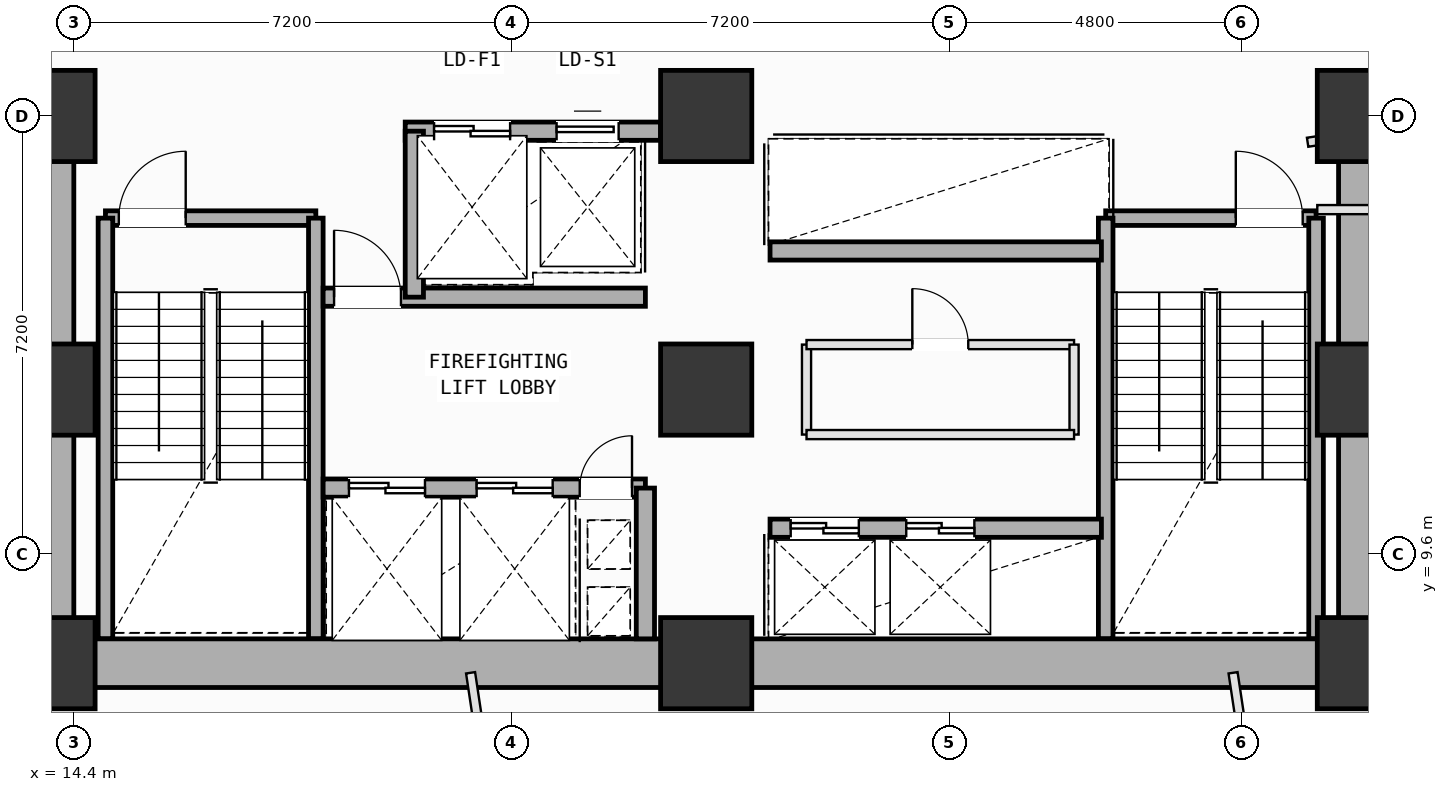
"""IFC4 building model, lengths in metres.
Left out: names, types, materials, properties, quantities, classifications, styles, units other than length and angle.
Written with IfcOpenShell. Run it as: python <this file> out.ifc"""

import sys

from ifc_helpers import new_model, si_unit, direction, frame, frame_2d, origin, origin_2d, place, context, subcontext, project, spatial, rectangle, extrude, element, fill, save


model = new_model("IFC4")
c1 = context("Model", 3, precision=1e-05, world=origin(), true_north=direction((0.0, 1.0)))
c2 = subcontext(c1, "Body", "Model", "MODEL_VIEW")
j1 = project(units=[si_unit("LENGTHUNIT", "METRE"), si_unit("PLANEANGLEUNIT", "RADIAN")], contexts=[c1])
p1 = place(None, origin())
s1 = spatial("IfcSite", under=j1, at=p1, CompositionType="ELEMENT")
p2 = place(p1, origin())
s2 = spatial("IfcBuilding", under=s1, at=p2, CompositionType="ELEMENT")
p3 = place(p2, frame((0.0, 0.0, 59.0)))
s3 = spatial("IfcBuildingStorey", under=s2, at=p3, CompositionType="ELEMENT", Elevation=59.0)
for number, where, z_axis, x_axis in (
    (1, (14.0, 7.8, 0.0), (0.0, 0.0, 1.0), (1.0, 0.0, 0.0)),
    (2, (14.0, 12.3, 0.0), (0.0, 0.0, 1.0), (1.0, 0.0, 0.0)),
    (3, (14.0, 16.8, 0.0), (0.0, 0.0, 1.0), (1.0, 0.0, 0.0)),
    (4, (24.8, 7.8, 0.0), (0.0, 0.0, 1.0), (1.0, 0.0, 0.0)),
    (5, (24.8, 12.3, 0.0), (0.0, 0.0, 1.0), (1.0, 0.0, 0.0)),
    (6, (24.8, 16.8, 0.0), (0.0, 0.0, 1.0), (1.0, 0.0, 0.0)),
    (7, (35.6, 7.8, 0.0), (0.0, 0.0, 1.0), (1.0, 0.0, 0.0)),
    (8, (35.6, 12.3, 0.0), (0.0, 0.0, 1.0), (1.0, 0.0, 0.0)),
    (9, (35.6, 16.8, 0.0), (0.0, 0.0, 1.0), (1.0, 0.0, 0.0)),
):
    element("IfcColumn", number, at=place(p3, frame(where, z_axis=z_axis, x_axis=x_axis)), inside=s3, PredefinedType="COLUMN", context=c2, shape_type="SweptSolid", body=[
        extrude(rectangle(XDim=1.5, YDim=1.5, at=origin_2d()), origin(), (0.0, 0.0, 1.0), 4.0),
    ])
p4 = place(p3, frame((14.92, 15.12, 0.0), z_axis=(0.0, 0.0, 1.0), x_axis=(1.0, 0.0, 0.0)))
e10 = element("IfcWall", 10, at=p4, inside=s3, PredefinedType="SOLIDWALL", context=c2, shape_type="SweptSolid", body=[
    extrude(rectangle(XDim=3.46, YDim=0.24, at=frame_2d((1.73, 0.0))), origin(), (0.0, 0.0, 1.0), 3.78),
])
p5 = place(p4, frame((0.22, 0.0, 0.0)))
e11 = element("IfcOpeningElement", 11, at=p5, cuts=e10, PredefinedType="OPENING", context=c2, shape_type="SweptSolid", body=[
    extrude(rectangle(XDim=1.1, YDim=2.15, at=frame_2d((0.55, 1.075))), frame((0.0, 0.13, 0.0), z_axis=(0.0, -1.0, 0.0), x_axis=(1.0, 0.0, 0.0)), (0.0, 0.0, 1.0), 0.26),
])
for number, where, z_axis, x_axis in (
    (12, (18.38, 15.12, 0.0), (0.0, 0.0, 1.0), (0.0, -1.0, 0.0)),
    (13, (14.92, 8.2, 0.0), (0.0, 0.0, 1.0), (0.0, 1.0, 0.0)),
):
    element("IfcWall", number, at=place(p3, frame(where, z_axis=z_axis, x_axis=x_axis)), inside=s3, PredefinedType="SOLIDWALL", context=c2, shape_type="SweptSolid", body=[
        extrude(rectangle(XDim=6.92, YDim=0.24, at=frame_2d((3.46, 0.0))), origin(), (0.0, 0.0, 1.0), 3.78),
    ])
p6 = place(p3, frame((31.37, 15.12, 0.0), z_axis=(0.0, 0.0, 1.0), x_axis=(1.0, 0.0, 0.0)))
e14 = element("IfcWall", 14, at=p6, inside=s3, PredefinedType="SOLIDWALL", context=c2, shape_type="SweptSolid", body=[
    extrude(rectangle(XDim=3.46, YDim=0.24, at=frame_2d((1.73, 0.0))), origin(), (0.0, 0.0, 1.0), 3.78),
])
p7 = place(p6, frame((2.14, 0.0, 0.0)))
e15 = element("IfcOpeningElement", 15, at=p7, cuts=e14, PredefinedType="OPENING", context=c2, shape_type="SweptSolid", body=[
    extrude(rectangle(XDim=1.1, YDim=2.15, at=frame_2d((0.55, 1.075))), frame((0.0, 0.13, 0.0), z_axis=(0.0, -1.0, 0.0), x_axis=(1.0, 0.0, 0.0)), (0.0, 0.0, 1.0), 0.26),
])
for number, where, z_axis, x_axis in (
    (16, (34.83, 15.12, 0.0), (0.0, 0.0, 1.0), (0.0, -1.0, 0.0)),
    (17, (31.37, 8.2, 0.0), (0.0, 0.0, 1.0), (0.0, 1.0, 0.0)),
):
    element("IfcWall", number, at=place(p3, frame(where, z_axis=z_axis, x_axis=x_axis)), inside=s3, PredefinedType="SOLIDWALL", context=c2, shape_type="SweptSolid", body=[
        extrude(rectangle(XDim=6.92, YDim=0.24, at=frame_2d((3.46, 0.0))), origin(), (0.0, 0.0, 1.0), 3.78),
    ])
for number, where, z_axis, x_axis in (
    (18, (14.0, 7.8, 0.0), (0.0, 0.0, 1.0), (1.0, 0.0, 0.0)),
    (19, (24.8, 7.8, 0.0), (0.0, 0.0, 1.0), (1.0, 0.0, 0.0)),
):
    element("IfcWall", number, at=place(p3, frame(where, z_axis=z_axis, x_axis=x_axis)), inside=s3, PredefinedType="SHEAR", context=c2, shape_type="SweptSolid", body=[
        extrude(rectangle(XDim=10.8, YDim=0.8, at=frame_2d((5.4, 0.0))), origin(), (0.0, 0.0, 1.0), 3.78),
    ])
for number, where, z_axis, x_axis in (
    (20, (35.6, 7.8, 0.0), (0.0, 0.0, 1.0), (0.0, 1.0, 0.0)),
    (21, (14.0, 16.8, 0.0), (0.0, 0.0, 1.0), (0.0, -1.0, 0.0)),
):
    element("IfcWall", number, at=place(p3, frame(where, z_axis=z_axis, x_axis=x_axis)), inside=s3, PredefinedType="SHEAR", context=c2, shape_type="SweptSolid", body=[
        extrude(rectangle(XDim=9.0, YDim=0.8, at=frame_2d((4.5, 0.0))), origin(), (0.0, 0.0, 1.0), 3.78),
    ])
p8 = place(p3, frame((19.85, 16.55, 0.0), z_axis=(0.0, 0.0, 1.0), x_axis=(1.0, 0.0, 0.0)))
e22 = element("IfcWall", 22, at=p8, inside=s3, PredefinedType="SOLIDWALL", context=c2, shape_type="SweptSolid", body=[
    extrude(rectangle(XDim=4.2, YDim=0.3, at=frame_2d((2.1, 0.0))), origin(), (0.0, 0.0, 1.0), 3.78),
])
p9 = place(p8, frame((0.475, 0.0, 0.0)))
e23 = element("IfcOpeningElement", 23, at=p9, cuts=e22, PredefinedType="OPENING", context=c2, shape_type="SweptSolid", body=[
    extrude(rectangle(XDim=1.25, YDim=2.18, at=frame_2d((0.625, 1.09))), frame((0.0, 0.16, 0.0), z_axis=(0.0, -1.0, 0.0), x_axis=(1.0, 0.0, 0.0)), (0.0, 0.0, 1.0), 0.32),
])
p10 = place(p8, frame((2.49, 0.0, 0.0)))
e24 = element("IfcOpeningElement", 24, at=p10, cuts=e22, PredefinedType="OPENING", context=c2, shape_type="SweptSolid", body=[
    extrude(rectangle(XDim=1.02, YDim=2.12, at=frame_2d((0.51, 1.06))), frame((0.0, 0.16, 0.0), z_axis=(0.0, -1.0, 0.0), x_axis=(1.0, 0.0, 0.0)), (0.0, 0.0, 1.0), 0.32),
])
p11 = place(p3, frame((18.5, 10.68, 0.0), z_axis=(0.0, 0.0, 1.0), x_axis=(1.0, 0.0, 0.0)))
e25 = element("IfcWall", 25, at=p11, inside=s3, PredefinedType="SOLIDWALL", context=c2, shape_type="SweptSolid", body=[
    extrude(rectangle(XDim=5.3, YDim=0.3, at=frame_2d((2.65, 0.0))), origin(), (0.0, 0.0, 1.0), 3.78),
])
p12 = place(p11, frame((4.22, 0.0, 0.0)))
e26 = element("IfcOpeningElement", 26, at=p12, cuts=e25, PredefinedType="OPENING", context=c2, shape_type="SweptSolid", body=[
    extrude(rectangle(XDim=0.86, YDim=2.06, at=frame_2d((0.43, 1.03))), frame((0.0, 0.16, 0.0), z_axis=(0.0, -1.0, 0.0), x_axis=(1.0, 0.0, 0.0)), (0.0, 0.0, 1.0), 0.32),
])
p13 = place(p11, frame((0.425, 0.0, 0.0)))
e27 = element("IfcOpeningElement", 27, at=p13, cuts=e25, PredefinedType="OPENING", context=c2, shape_type="SweptSolid", body=[
    extrude(rectangle(XDim=1.25, YDim=2.18, at=frame_2d((0.625, 1.09))), frame((0.0, 0.16, 0.0), z_axis=(0.0, -1.0, 0.0), x_axis=(1.0, 0.0, 0.0)), (0.0, 0.0, 1.0), 0.32),
])
p14 = place(p11, frame((2.525, 0.0, 0.0)))
e28 = element("IfcOpeningElement", 28, at=p14, cuts=e25, PredefinedType="OPENING", context=c2, shape_type="SweptSolid", body=[
    extrude(rectangle(XDim=1.25, YDim=2.18, at=frame_2d((0.625, 1.09))), frame((0.0, 0.16, 0.0), z_axis=(0.0, -1.0, 0.0), x_axis=(1.0, 0.0, 0.0)), (0.0, 0.0, 1.0), 0.32),
])
p15 = place(p3, frame((18.5, 13.82, 0.0), z_axis=(0.0, 0.0, 1.0), x_axis=(1.0, 0.0, 0.0)))
e29 = element("IfcWall", 29, at=p15, inside=s3, PredefinedType="SOLIDWALL", context=c2, shape_type="SweptSolid", body=[
    extrude(rectangle(XDim=5.3, YDim=0.3, at=frame_2d((2.65, 0.0))), origin(), (0.0, 0.0, 1.0), 3.78),
])
p16 = place(p15, frame((0.18, 0.0, 0.0)))
e30 = element("IfcOpeningElement", 30, at=p16, cuts=e29, PredefinedType="OPENING", context=c2, shape_type="SweptSolid", body=[
    extrude(rectangle(XDim=1.1, YDim=2.15, at=frame_2d((0.55, 1.075))), frame((0.0, 0.16, 0.0), z_axis=(0.0, -1.0, 0.0), x_axis=(1.0, 0.0, 0.0)), (0.0, 0.0, 1.0), 0.32),
])
p17 = place(p3, frame((23.8, 8.2, 0.0), z_axis=(0.0, 0.0, 1.0), x_axis=(0.0, 1.0, 0.0)))
e31 = element("IfcWall", 31, at=p17, inside=s3, PredefinedType="SOLIDWALL", context=c2, shape_type="SweptSolid", body=[
    extrude(rectangle(XDim=2.48, YDim=0.3, at=frame_2d((1.24, 0.0))), origin(), (0.0, 0.0, 1.0), 3.78),
])
p18 = place(p3, frame((20.0, 13.82, 0.0), z_axis=(0.0, 0.0, 1.0), x_axis=(0.0, 1.0, 0.0)))
e32 = element("IfcWall", 32, at=p18, inside=s3, PredefinedType="SOLIDWALL", context=c2, shape_type="SweptSolid", body=[
    extrude(rectangle(XDim=2.73, YDim=0.3, at=frame_2d((1.365, 0.0))), origin(), (0.0, 0.0, 1.0), 3.78),
])
p19 = place(p3, frame((25.85, 10.02, 0.0), z_axis=(0.0, 0.0, 1.0), x_axis=(1.0, 0.0, 0.0)))
e33 = element("IfcWall", 33, at=p19, inside=s3, PredefinedType="SOLIDWALL", context=c2, shape_type="SweptSolid", body=[
    extrude(rectangle(XDim=5.45, YDim=0.3, at=frame_2d((2.725, 0.0))), origin(), (0.0, 0.0, 1.0), 3.78),
])
p20 = place(p19, frame((0.34, 0.0, 0.0)))
e34 = element("IfcOpeningElement", 34, at=p20, cuts=e33, PredefinedType="OPENING", context=c2, shape_type="SweptSolid", body=[
    extrude(rectangle(XDim=1.12, YDim=2.15, at=frame_2d((0.56, 1.075))), frame((0.0, 0.16, 0.0), z_axis=(0.0, -1.0, 0.0), x_axis=(1.0, 0.0, 0.0)), (0.0, 0.0, 1.0), 0.32),
])
p21 = place(p19, frame((2.24, 0.0, 0.0)))
e35 = element("IfcOpeningElement", 35, at=p21, cuts=e33, PredefinedType="OPENING", context=c2, shape_type="SweptSolid", body=[
    extrude(rectangle(XDim=1.12, YDim=2.15, at=frame_2d((0.56, 1.075))), frame((0.0, 0.16, 0.0), z_axis=(0.0, -1.0, 0.0), x_axis=(1.0, 0.0, 0.0)), (0.0, 0.0, 1.0), 0.32),
])
p22 = place(p3, frame((25.85, 14.58, 0.0), z_axis=(0.0, 0.0, 1.0), x_axis=(1.0, 0.0, 0.0)))
e36 = element("IfcWall", 36, at=p22, inside=s3, PredefinedType="SOLIDWALL", context=c2, shape_type="SweptSolid", body=[
    extrude(rectangle(XDim=5.45, YDim=0.3, at=frame_2d((2.725, 0.0))), origin(), (0.0, 0.0, 1.0), 3.78),
])
p23 = place(p3, frame((26.45, 11.56, 0.0), z_axis=(0.0, 0.0, 1.0), x_axis=(0.0, 1.0, 0.0)))
e37 = element("IfcWall", 37, at=p23, inside=s3, PredefinedType="PARTITIONING", context=c2, shape_type="SweptSolid", body=[
    extrude(rectangle(XDim=1.48, YDim=0.15, at=frame_2d((0.74, 0.0))), origin(), (0.0, 0.0, 1.0), 3.78),
])
p24 = place(p3, frame((26.45, 13.04, 0.0), z_axis=(0.0, 0.0, 1.0), x_axis=(1.0, 0.0, 0.0)))
e38 = element("IfcWall", 38, at=p24, inside=s3, PredefinedType="PARTITIONING", context=c2, shape_type="SweptSolid", body=[
    extrude(rectangle(XDim=4.4, YDim=0.15, at=frame_2d((2.2, 0.0))), origin(), (0.0, 0.0, 1.0), 3.78),
])
p25 = place(p24, frame((1.74, 0.0, 0.0)))
e39 = element("IfcOpeningElement", 39, at=p25, cuts=e38, PredefinedType="OPENING", context=c2, shape_type="SweptSolid", body=[
    extrude(rectangle(XDim=0.92, YDim=2.1, at=frame_2d((0.46, 1.05))), frame((0.0, 0.085, 0.0), z_axis=(0.0, -1.0, 0.0), x_axis=(1.0, 0.0, 0.0)), (0.0, 0.0, 1.0), 0.17),
])
p26 = place(p3, frame((30.85, 13.04, 0.0), z_axis=(0.0, 0.0, 1.0), x_axis=(0.0, -1.0, 0.0)))
e40 = element("IfcWall", 40, at=p26, inside=s3, PredefinedType="PARTITIONING", context=c2, shape_type="SweptSolid", body=[
    extrude(rectangle(XDim=1.48, YDim=0.15, at=frame_2d((0.74, 0.0))), origin(), (0.0, 0.0, 1.0), 3.78),
])
p27 = place(p3, frame((30.85, 11.56, 0.0), z_axis=(0.0, 0.0, 1.0), x_axis=(-1.0, 0.0, 0.0)))
e41 = element("IfcWall", 41, at=p27, inside=s3, PredefinedType="PARTITIONING", context=c2, shape_type="SweptSolid", body=[
    extrude(rectangle(XDim=4.4, YDim=0.15, at=frame_2d((2.2, 0.0))), origin(), (0.0, 0.0, 1.0), 3.78),
])
p28 = place(p3, frame((20.925, 7.642, 0.0), z_axis=(0.0, 0.0, 1.0), x_axis=(0.148727506092, -0.988878217442, 0.0)))
e42 = element("IfcWall", 42, at=p28, inside=s3, PredefinedType="PARTITIONING", context=c2, shape_type="SweptSolid", body=[
    extrude(rectangle(XDim=7.032, YDim=0.15, at=frame_2d((3.516, 0.0))), origin(), (0.0, 0.0, 1.0), 3.78),
])
p29 = place(p28, frame((3.238, 0.0, 0.0)))
e43 = element("IfcOpeningElement", 43, at=p29, cuts=e42, PredefinedType="OPENING", context=c2, shape_type="SweptSolid", body=[
    extrude(rectangle(XDim=0.86, YDim=2.06, at=frame_2d((0.43, 1.03))), frame((0.0, 0.085, 0.0), z_axis=(0.0, -1.0, 0.0), x_axis=(1.0, 0.0, 0.0)), (0.0, 0.0, 1.0), 0.17),
])
p30 = place(p3, frame((33.465, 7.642, 0.0), z_axis=(0.0, 0.0, 1.0), x_axis=(0.14857781012, -0.988900720164, 0.0)))
e44 = element("IfcWall", 44, at=p30, inside=s3, PredefinedType="PARTITIONING", context=c2, shape_type="SweptSolid", body=[
    extrude(rectangle(XDim=5.533, YDim=0.15, at=frame_2d((2.766, 0.0))), origin(), (0.0, 0.0, 1.0), 3.78),
])
p31 = place(p30, frame((2.488, 0.0, 0.0)))
e45 = element("IfcOpeningElement", 45, at=p31, cuts=e44, PredefinedType="OPENING", context=c2, shape_type="SweptSolid", body=[
    extrude(rectangle(XDim=0.86, YDim=2.06, at=frame_2d((0.43, 1.03))), frame((0.0, 0.085, 0.0), z_axis=(0.0, -1.0, 0.0), x_axis=(1.0, 0.0, 0.0)), (0.0, 0.0, 1.0), 0.17),
])
p32 = place(p3, frame((35.6, 7.5, 0.0), z_axis=(0.0, 0.0, 1.0), x_axis=(1.0, 0.0, 0.0)))
e46 = element("IfcWall", 46, at=p32, inside=s3, PredefinedType="PARTITIONING", context=c2, shape_type="SweptSolid", body=[
    extrude(rectangle(XDim=0.55, YDim=0.15, at=frame_2d((0.275, 0.0))), origin(), (0.0, 0.0, 1.0), 3.445),
])
p33 = place(p3, frame((36.15, 15.26, 0.0), z_axis=(0.0, 0.0, 1.0), x_axis=(-1.0, 0.0, 0.0)))
e47 = element("IfcWall", 47, at=p33, inside=s3, PredefinedType="PARTITIONING", context=c2, shape_type="SweptSolid", body=[
    extrude(rectangle(XDim=1.3, YDim=0.15, at=frame_2d((0.65, 0.0))), origin(), (0.0, 0.0, 1.0), 3.78),
])
p34 = place(p3, frame((34.691, 16.368, 0.0), z_axis=(0.0, 0.0, 1.0), x_axis=(0.988798318439, 0.149257781885, 0.0)))
e48 = element("IfcWall", 48, at=p34, inside=s3, PredefinedType="PARTITIONING", context=c2, shape_type="SweptSolid", body=[
    extrude(rectangle(XDim=0.885, YDim=0.15, at=frame_2d((0.442, 0.0))), origin(), (0.0, 0.0, 1.0), 2.865),
])
p35 = place(p3, frame((35.566, 16.5, 0.0), z_axis=(0.0, 0.0, 1.0), x_axis=(1.0, 0.0, 0.0)))
e49 = element("IfcWall", 49, at=p35, inside=s3, PredefinedType="PARTITIONING", context=c2, shape_type="SweptSolid", body=[
    extrude(rectangle(XDim=0.934, YDim=0.15, at=frame_2d((0.467, 0.0))), origin(), (0.0, 0.0, 1.0), 2.865),
])
p36 = place(p5, origin())
e50 = element("IfcDoor", 50, at=p36, inside=s3, OperationType="SINGLE_SWING_RIGHT", PredefinedType="DOOR", context=c2, shape_type="SweptSolid", body=[
    extrude(rectangle(XDim=1.1, YDim=2.15, at=frame_2d((0.55, 1.075))), frame((0.0, 0.025, 0.0), z_axis=(0.0, -1.0, 0.0), x_axis=(1.0, 0.0, 0.0)), (0.0, 0.0, 1.0), 0.05),
])
fill(e11, e50)
p37 = place(p7, origin())
e51 = element("IfcDoor", 51, at=p37, inside=s3, OperationType="SINGLE_SWING_LEFT", PredefinedType="DOOR", context=c2, shape_type="SweptSolid", body=[
    extrude(rectangle(XDim=1.1, YDim=2.15, at=frame_2d((0.55, 1.075))), frame((0.0, 0.025, 0.0), z_axis=(0.0, -1.0, 0.0), x_axis=(1.0, 0.0, 0.0)), (0.0, 0.0, 1.0), 0.05),
])
fill(e15, e51)
p38 = place(p12, origin())
e52 = element("IfcDoor", 52, at=p38, inside=s3, OperationType="SINGLE_SWING_RIGHT", PredefinedType="DOOR", context=c2, shape_type="SweptSolid", body=[
    extrude(rectangle(XDim=0.86, YDim=2.06, at=frame_2d((0.43, 1.03))), frame((0.0, 0.025, 0.0), z_axis=(0.0, -1.0, 0.0), x_axis=(1.0, 0.0, 0.0)), (0.0, 0.0, 1.0), 0.05),
])
fill(e26, e52)
p39 = place(p16, origin())
e53 = element("IfcDoor", 53, at=p39, inside=s3, OperationType="SINGLE_SWING_LEFT", PredefinedType="DOOR", context=c2, shape_type="SweptSolid", body=[
    extrude(rectangle(XDim=1.1, YDim=2.15, at=frame_2d((0.55, 1.075))), frame((0.0, 0.025, 0.0), z_axis=(0.0, -1.0, 0.0), x_axis=(1.0, 0.0, 0.0)), (0.0, 0.0, 1.0), 0.05),
])
fill(e30, e53)
p40 = place(p13, origin())
e54 = element("IfcDoor", 54, at=p40, inside=s3, OperationType="DOUBLE_DOOR_SLIDING", PredefinedType="DOOR", context=c2, shape_type="SweptSolid", body=[
    extrude(rectangle(XDim=1.25, YDim=2.18, at=frame_2d((0.625, 1.09))), frame((0.0, 0.025, 0.0), z_axis=(0.0, -1.0, 0.0), x_axis=(1.0, 0.0, 0.0)), (0.0, 0.0, 1.0), 0.05),
])
fill(e27, e54)
p41 = place(p14, origin())
e55 = element("IfcDoor", 55, at=p41, inside=s3, OperationType="DOUBLE_DOOR_SLIDING", PredefinedType="DOOR", context=c2, shape_type="SweptSolid", body=[
    extrude(rectangle(XDim=1.25, YDim=2.18, at=frame_2d((0.625, 1.09))), frame((0.0, 0.025, 0.0), z_axis=(0.0, -1.0, 0.0), x_axis=(1.0, 0.0, 0.0)), (0.0, 0.0, 1.0), 0.05),
])
fill(e28, e55)
p42 = place(p20, origin())
e56 = element("IfcDoor", 56, at=p42, inside=s3, OperationType="DOUBLE_DOOR_SLIDING", PredefinedType="DOOR", context=c2, shape_type="SweptSolid", body=[
    extrude(rectangle(XDim=1.12, YDim=2.15, at=frame_2d((0.56, 1.075))), frame((0.0, 0.025, 0.0), z_axis=(0.0, -1.0, 0.0), x_axis=(1.0, 0.0, 0.0)), (0.0, 0.0, 1.0), 0.05),
])
fill(e34, e56)
p43 = place(p21, origin())
e57 = element("IfcDoor", 57, at=p43, inside=s3, OperationType="DOUBLE_DOOR_SLIDING", PredefinedType="DOOR", context=c2, shape_type="SweptSolid", body=[
    extrude(rectangle(XDim=1.12, YDim=2.15, at=frame_2d((0.56, 1.075))), frame((0.0, 0.025, 0.0), z_axis=(0.0, -1.0, 0.0), x_axis=(1.0, 0.0, 0.0)), (0.0, 0.0, 1.0), 0.05),
])
fill(e35, e57)
p44 = place(p9, origin())
e58 = element("IfcDoor", 58, at=p44, inside=s3, OperationType="DOUBLE_DOOR_SLIDING", PredefinedType="DOOR", context=c2, shape_type="SweptSolid", body=[
    extrude(rectangle(XDim=1.25, YDim=2.18, at=frame_2d((0.625, 1.09))), frame((0.0, 0.025, 0.0), z_axis=(0.0, -1.0, 0.0), x_axis=(1.0, 0.0, 0.0)), (0.0, 0.0, 1.0), 0.05),
])
fill(e23, e58)
p45 = place(p10, origin())
e59 = element("IfcDoor", 59, at=p45, inside=s3, OperationType="SLIDING_TO_LEFT", PredefinedType="DOOR", context=c2, shape_type="SweptSolid", body=[
    extrude(rectangle(XDim=1.02, YDim=2.12, at=frame_2d((0.51, 1.06))), frame((0.0, 0.025, 0.0), z_axis=(0.0, -1.0, 0.0), x_axis=(1.0, 0.0, 0.0)), (0.0, 0.0, 1.0), 0.05),
])
fill(e24, e59)
p46 = place(p25, origin())
e60 = element("IfcDoor", 60, at=p46, inside=s3, OperationType="SINGLE_SWING_LEFT", PredefinedType="DOOR", context=c2, shape_type="SweptSolid", body=[
    extrude(rectangle(XDim=0.92, YDim=2.1, at=frame_2d((0.46, 1.05))), frame((0.0, 0.025, 0.0), z_axis=(0.0, -1.0, 0.0), x_axis=(1.0, 0.0, 0.0)), (0.0, 0.0, 1.0), 0.05),
])
fill(e39, e60)
save(model, sys.argv[1])
